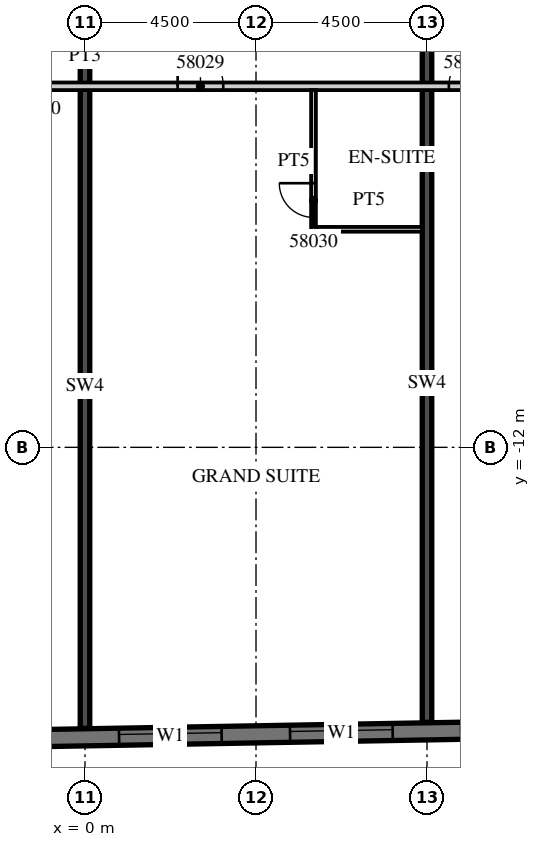
"""IFC4 building model, lengths in metres.
Left out: names, types, materials, properties, quantities, classifications, styles, units other than length and angle.
Written with IfcOpenShell. Run it as: python <this file> out.ifc"""

import sys

from ifc_helpers import new_model, si_unit, direction, frame, frame_2d, origin, place, context, subcontext, project, spatial, rectangle, extrude, element, fill, save


model = new_model("IFC4")
c1 = context("Model", 3, precision=1e-05, world=origin(), true_north=direction((0.0, 1.0)))
c2 = subcontext(c1, "Body", "Model", "MODEL_VIEW")
j1 = project(units=[si_unit("LENGTHUNIT", "METRE"), si_unit("PLANEANGLEUNIT", "RADIAN")], contexts=[c1])
p1 = place(None, origin())
s1 = spatial("IfcSite", under=j1, at=p1, CompositionType="ELEMENT")
p2 = place(p1, origin())
s2 = spatial("IfcBuilding", under=s1, at=p2, CompositionType="ELEMENT")
p3 = place(p2, frame((0.0, 0.0, 237.5)))
s3 = spatial("IfcBuildingStorey", under=s2, at=p3, CompositionType="ELEMENT", Elevation=237.5)
p4 = place(p3, frame((0.0, -19.393, 0.0), z_axis=(0.0, 0.0, 1.0), x_axis=(0.0, 1.0, 0.0)))
e1 = element("IfcWall", 1, at=p4, inside=s3, PredefinedType="SHEAR", context=c2, shape_type="SweptSolid", body=[
    extrude(rectangle(XDim=17.993, YDim=0.25, at=frame_2d((8.997, 0.0))), origin(), (0.0, 0.0, 1.0), 3.3),
])
p5 = place(p3, frame((9.0, -19.236, 0.0), z_axis=(0.0, 0.0, 1.0), x_axis=(0.0, 1.0, 0.0)))
e2 = element("IfcWall", 2, at=p5, inside=s3, PredefinedType="SHEAR", context=c2, shape_type="SweptSolid", body=[
    extrude(rectangle(XDim=17.836, YDim=0.25, at=frame_2d((8.918, 0.0))), origin(), (0.0, 0.0, 1.0), 3.3),
])
p6 = place(p3, frame((-13.504, -19.866, 0.0), z_axis=(0.0, 0.0, 1.0), x_axis=(0.999847672978, 0.017453676992, 0.0)))
e3 = element("IfcWall", 3, at=p6, inside=s3, PredefinedType="SOLIDWALL", context=c2, shape_type="SweptSolid", body=[
    extrude(rectangle(XDim=52.86, YDim=0.45, at=frame_2d((26.43, 0.0))), origin(), (0.0, 0.0, 1.0), 3.02),
])
p7 = place(p6, frame((0.9, 0.0, 0.45)))
e4 = element("IfcOpeningElement", 4, at=p7, cuts=e3, PredefinedType="OPENING", context=c2, shape_type="SweptSolid", body=[
    extrude(rectangle(XDim=2.7, YDim=2.25, at=frame_2d((1.35, 1.125))), frame((0.0, 0.235, 0.0), z_axis=(0.0, -1.0, 0.0), x_axis=(1.0, 0.0, 0.0)), (0.0, 0.0, 1.0), 0.47),
])
p8 = place(p6, frame((5.401, 0.0, 0.45)))
e5 = element("IfcOpeningElement", 5, at=p8, cuts=e3, PredefinedType="OPENING", context=c2, shape_type="SweptSolid", body=[
    extrude(rectangle(XDim=2.7, YDim=2.25, at=frame_2d((1.35, 1.125))), frame((0.0, 0.235, 0.0), z_axis=(0.0, -1.0, 0.0), x_axis=(1.0, 0.0, 0.0)), (0.0, 0.0, 1.0), 0.47),
])
p9 = place(p6, frame((9.902, 0.0, 0.45)))
e6 = element("IfcOpeningElement", 6, at=p9, cuts=e3, PredefinedType="OPENING", context=c2, shape_type="SweptSolid", body=[
    extrude(rectangle(XDim=2.7, YDim=2.25, at=frame_2d((1.35, 1.125))), frame((0.0, 0.235, 0.0), z_axis=(0.0, -1.0, 0.0), x_axis=(1.0, 0.0, 0.0)), (0.0, 0.0, 1.0), 0.47),
])
p10 = place(p6, frame((14.402, 0.0, 0.45)))
e7 = element("IfcOpeningElement", 7, at=p10, cuts=e3, PredefinedType="OPENING", context=c2, shape_type="SweptSolid", body=[
    extrude(rectangle(XDim=2.7, YDim=2.25, at=frame_2d((1.35, 1.125))), frame((0.0, 0.235, 0.0), z_axis=(0.0, -1.0, 0.0), x_axis=(1.0, 0.0, 0.0)), (0.0, 0.0, 1.0), 0.47),
])
p11 = place(p6, frame((18.903, 0.0, 0.45)))
e8 = element("IfcOpeningElement", 8, at=p11, cuts=e3, PredefinedType="OPENING", context=c2, shape_type="SweptSolid", body=[
    extrude(rectangle(XDim=2.7, YDim=2.25, at=frame_2d((1.35, 1.125))), frame((0.0, 0.235, 0.0), z_axis=(0.0, -1.0, 0.0), x_axis=(1.0, 0.0, 0.0)), (0.0, 0.0, 1.0), 0.47),
])
p12 = place(p6, frame((23.404, 0.0, 0.45)))
e9 = element("IfcOpeningElement", 9, at=p12, cuts=e3, PredefinedType="OPENING", context=c2, shape_type="SweptSolid", body=[
    extrude(rectangle(XDim=2.7, YDim=2.25, at=frame_2d((1.35, 1.125))), frame((0.0, 0.235, 0.0), z_axis=(0.0, -1.0, 0.0), x_axis=(1.0, 0.0, 0.0)), (0.0, 0.0, 1.0), 0.47),
])
p13 = place(p6, frame((27.904, 0.0, 0.45)))
e10 = element("IfcOpeningElement", 10, at=p13, cuts=e3, PredefinedType="OPENING", context=c2, shape_type="SweptSolid", body=[
    extrude(rectangle(XDim=2.7, YDim=2.25, at=frame_2d((1.35, 1.125))), frame((0.0, 0.235, 0.0), z_axis=(0.0, -1.0, 0.0), x_axis=(1.0, 0.0, 0.0)), (0.0, 0.0, 1.0), 0.47),
])
p14 = place(p6, frame((32.405, 0.0, 0.45)))
e11 = element("IfcOpeningElement", 11, at=p14, cuts=e3, PredefinedType="OPENING", context=c2, shape_type="SweptSolid", body=[
    extrude(rectangle(XDim=2.7, YDim=2.25, at=frame_2d((1.35, 1.125))), frame((0.0, 0.235, 0.0), z_axis=(0.0, -1.0, 0.0), x_axis=(1.0, 0.0, 0.0)), (0.0, 0.0, 1.0), 0.47),
])
p15 = place(p6, frame((36.906, 0.0, 0.45)))
e12 = element("IfcOpeningElement", 12, at=p15, cuts=e3, PredefinedType="OPENING", context=c2, shape_type="SweptSolid", body=[
    extrude(rectangle(XDim=2.7, YDim=2.25, at=frame_2d((1.35, 1.125))), frame((0.0, 0.235, 0.0), z_axis=(0.0, -1.0, 0.0), x_axis=(1.0, 0.0, 0.0)), (0.0, 0.0, 1.0), 0.47),
])
p16 = place(p6, frame((41.406, 0.0, 0.45)))
e13 = element("IfcOpeningElement", 13, at=p16, cuts=e3, PredefinedType="OPENING", context=c2, shape_type="SweptSolid", body=[
    extrude(rectangle(XDim=2.7, YDim=2.25, at=frame_2d((1.35, 1.125))), frame((0.0, 0.235, 0.0), z_axis=(0.0, -1.0, 0.0), x_axis=(1.0, 0.0, 0.0)), (0.0, 0.0, 1.0), 0.47),
])
p17 = place(p6, frame((45.907, 0.0, 0.45)))
e14 = element("IfcOpeningElement", 14, at=p17, cuts=e3, PredefinedType="OPENING", context=c2, shape_type="SweptSolid", body=[
    extrude(rectangle(XDim=2.7, YDim=2.25, at=frame_2d((1.35, 1.125))), frame((0.0, 0.235, 0.0), z_axis=(0.0, -1.0, 0.0), x_axis=(1.0, 0.0, 0.0)), (0.0, 0.0, 1.0), 0.47),
])
p18 = place(p3, frame((-13.5, -2.5, 0.0), z_axis=(0.0, 0.0, 1.0), x_axis=(1.0, 0.0, 0.0)))
e15 = element("IfcWall", 15, at=p18, inside=s3, PredefinedType="PARTITIONING", context=c2, shape_type="SweptSolid", body=[
    extrude(rectangle(XDim=27.0, YDim=0.2, at=frame_2d((13.5, 0.0))), origin(), (0.0, 0.0, 1.0), 3.02),
])
p19 = place(p18, frame((0.575, 0.0, 0.0)))
e16 = element("IfcOpeningElement", 16, at=p19, cuts=e15, PredefinedType="OPENING", context=c2, shape_type="SweptSolid", body=[
    extrude(rectangle(XDim=1.0, YDim=2.1, at=frame_2d((0.5, 1.05))), frame((0.0, 0.11, 0.0), z_axis=(0.0, -1.0, 0.0), x_axis=(1.0, 0.0, 0.0)), (0.0, 0.0, 1.0), 0.22),
])
p20 = place(p18, frame((9.863, 0.0, 0.0)))
e17 = element("IfcOpeningElement", 17, at=p20, cuts=e15, PredefinedType="OPENING", context=c2, shape_type="SweptSolid", body=[
    extrude(rectangle(XDim=1.2, YDim=2.1, at=frame_2d((0.6, 1.05))), frame((0.0, 0.11, 0.0), z_axis=(0.0, -1.0, 0.0), x_axis=(1.0, 0.0, 0.0)), (0.0, 0.0, 1.0), 0.22),
])
p21 = place(p18, frame((15.938, 0.0, 0.0)))
e18 = element("IfcOpeningElement", 18, at=p21, cuts=e15, PredefinedType="OPENING", context=c2, shape_type="SweptSolid", body=[
    extrude(rectangle(XDim=1.2, YDim=2.1, at=frame_2d((0.6, 1.05))), frame((0.0, 0.11, 0.0), z_axis=(0.0, -1.0, 0.0), x_axis=(1.0, 0.0, 0.0)), (0.0, 0.0, 1.0), 0.22),
])
p22 = place(p18, frame((23.075, 0.0, 0.0)))
e19 = element("IfcOpeningElement", 19, at=p22, cuts=e15, PredefinedType="OPENING", context=c2, shape_type="SweptSolid", body=[
    extrude(rectangle(XDim=1.0, YDim=2.1, at=frame_2d((0.5, 1.05))), frame((0.0, 0.11, 0.0), z_axis=(0.0, -1.0, 0.0), x_axis=(1.0, 0.0, 0.0)), (0.0, 0.0, 1.0), 0.22),
])
p23 = place(p3, frame((6.013, -6.325, 0.0), z_axis=(0.0, 0.0, 1.0), x_axis=(0.0, 1.0, 0.0)))
e20 = element("IfcWall", 20, at=p23, inside=s3, PredefinedType="PARTITIONING", context=c2, shape_type="SweptSolid", body=[
    extrude(rectangle(XDim=3.725, YDim=0.125, at=frame_2d((1.862, 0.0))), origin(), (0.0, 0.0, 1.0), 3.02),
])
p24 = place(p23, frame((0.375, 0.0, 0.0)))
e21 = element("IfcOpeningElement", 21, at=p24, cuts=e20, PredefinedType="OPENING", context=c2, shape_type="SweptSolid", body=[
    extrude(rectangle(XDim=0.9, YDim=2.1, at=frame_2d((0.45, 1.05))), frame((0.0, 0.073, 0.0), z_axis=(0.0, -1.0, 0.0), x_axis=(1.0, 0.0, 0.0)), (0.0, 0.0, 1.0), 0.145),
])
p25 = place(p3, frame((6.075, -6.263, 0.0), z_axis=(0.0, 0.0, 1.0), x_axis=(1.0, 0.0, 0.0)))
e22 = element("IfcWall", 22, at=p25, inside=s3, PredefinedType="PARTITIONING", context=c2, shape_type="SweptSolid", body=[
    extrude(rectangle(XDim=2.8, YDim=0.125, at=frame_2d((1.4, 0.0))), origin(), (0.0, 0.0, 1.0), 3.02),
])
p26 = place(p10, origin())
e23 = element("IfcWindow", 23, at=p26, inside=s3, PartitioningType="SINGLE_PANEL", PredefinedType="WINDOW", context=c2, shape_type="SweptSolid", body=[
    extrude(rectangle(XDim=2.7, YDim=2.25, at=frame_2d((1.35, 1.125))), frame((0.0, 0.09, 0.0), z_axis=(0.0, -1.0, 0.0), x_axis=(1.0, 0.0, 0.0)), (0.0, 0.0, 1.0), 0.06),
])
fill(e7, e23)
p27 = place(p11, origin())
e24 = element("IfcWindow", 24, at=p27, inside=s3, PartitioningType="SINGLE_PANEL", PredefinedType="WINDOW", context=c2, shape_type="SweptSolid", body=[
    extrude(rectangle(XDim=2.7, YDim=2.25, at=frame_2d((1.35, 1.125))), frame((0.0, 0.09, 0.0), z_axis=(0.0, -1.0, 0.0), x_axis=(1.0, 0.0, 0.0)), (0.0, 0.0, 1.0), 0.06),
])
fill(e8, e24)
p28 = place(p21, origin())
e25 = element("IfcDoor", 25, at=p28, inside=s3, OperationType="SINGLE_SWING_LEFT", PredefinedType="DOOR", context=c2, shape_type="SweptSolid", body=[
    extrude(rectangle(XDim=1.2, YDim=2.1, at=frame_2d((0.6, 1.05))), frame((0.0, 0.025, 0.0), z_axis=(0.0, -1.0, 0.0), x_axis=(1.0, 0.0, 0.0)), (0.0, 0.0, 1.0), 0.05),
])
fill(e18, e25)
p29 = place(p24, origin())
e26 = element("IfcDoor", 26, at=p29, inside=s3, OperationType="SINGLE_SWING_RIGHT", PredefinedType="DOOR", context=c2, shape_type="SweptSolid", body=[
    extrude(rectangle(XDim=0.9, YDim=2.1, at=frame_2d((0.45, 1.05))), frame((0.0, 0.025, 0.0), z_axis=(0.0, -1.0, 0.0), x_axis=(1.0, 0.0, 0.0)), (0.0, 0.0, 1.0), 0.05),
])
fill(e21, e26)
p30 = place(p22, origin())
e27 = element("IfcDoor", 27, at=p30, inside=s3, OperationType="SINGLE_SWING_RIGHT", PredefinedType="DOOR", context=c2, shape_type="SweptSolid", body=[
    extrude(rectangle(XDim=1.0, YDim=2.1, at=frame_2d((0.5, 1.05))), frame((0.0, 0.025, 0.0), z_axis=(0.0, -1.0, 0.0), x_axis=(1.0, 0.0, 0.0)), (0.0, 0.0, 1.0), 0.05),
])
fill(e19, e27)
save(model, sys.argv[1])
